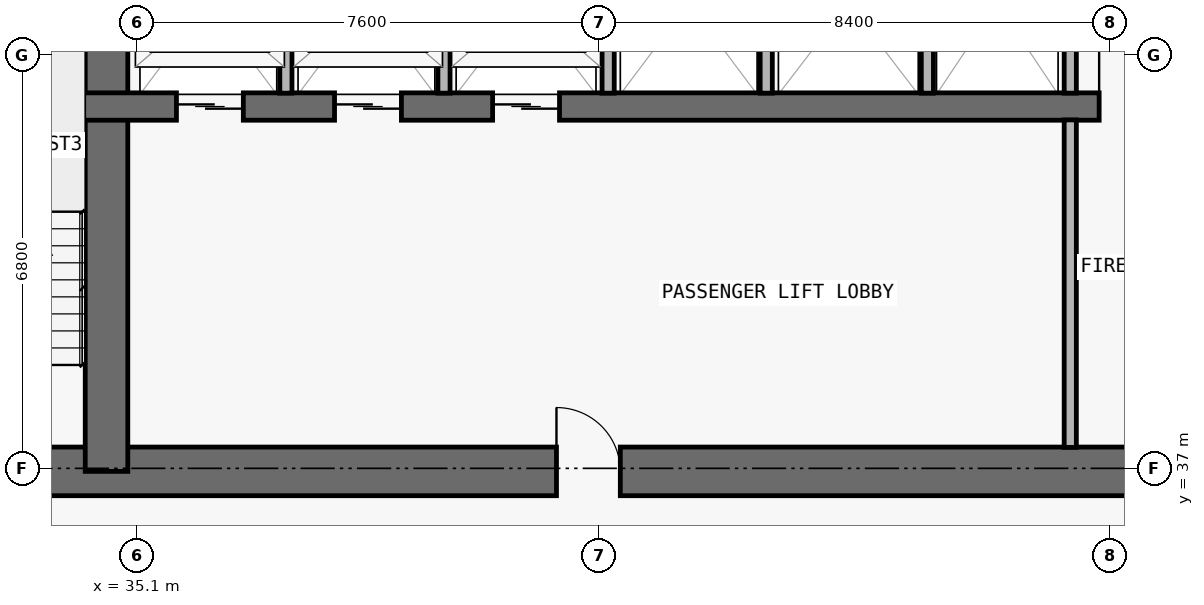
"""IFC4 building model, lengths in metres.
Left out: names, types, materials, properties, quantities, classifications, styles, units other than length and angle.
Written with IfcOpenShell. Run it as: python <this file> out.ifc"""

import sys

from ifc_helpers import new_model, si_unit, direction, frame, frame_2d, origin, place, context, subcontext, project, spatial, rectangle, extrude, element, fill, save


model = new_model("IFC4")
c1 = context("Model", 3, precision=1e-05, world=origin(), true_north=direction((0.0, 1.0)))
c2 = subcontext(c1, "Body", "Model", "MODEL_VIEW")
j1 = project(units=[si_unit("LENGTHUNIT", "METRE"), si_unit("PLANEANGLEUNIT", "RADIAN")], contexts=[c1])
p1 = place(None, origin())
s1 = spatial("IfcSite", under=j1, at=p1, CompositionType="ELEMENT")
p2 = place(p1, origin())
s2 = spatial("IfcBuilding", under=s1, at=p2, CompositionType="ELEMENT")
p3 = place(p2, frame((0.0, 0.0, 91.2)))
s3 = spatial("IfcBuildingStorey", under=s2, at=p3, CompositionType="ELEMENT", Elevation=91.2)
p4 = place(p3, frame((17.85, 36.95, 0.0), z_axis=(0.0, 0.0, 1.0), x_axis=(1.0, 0.0, 0.0)))
e1 = element("IfcWall", 1, at=p4, inside=s3, PredefinedType="SHEAR", context=c2, shape_type="SweptSolid", body=[
    extrude(rectangle(XDim=42.1, YDim=0.8, at=frame_2d((21.05, 0.0))), origin(), (0.0, 0.0, 1.0), 3.05),
])
p5 = place(p4, frame((14.45, 0.0, 0.0)))
e2 = element("IfcOpeningElement", 2, at=p5, cuts=e1, PredefinedType="OPENING", context=c2, shape_type="SweptSolid", body=[
    extrude(rectangle(XDim=1.1, YDim=2.15, at=frame_2d((0.55, 1.075))), frame((0.0, 0.41, 0.0), z_axis=(0.0, -1.0, 0.0), x_axis=(1.0, 0.0, 0.0)), (0.0, 0.0, 1.0), 0.82),
])
p6 = place(p4, frame((6.3, 0.0, 0.0)))
e3 = element("IfcOpeningElement", 3, at=p6, cuts=e1, PredefinedType="OPENING", context=c2, shape_type="SweptSolid", body=[
    extrude(rectangle(XDim=1.05, YDim=2.15, at=frame_2d((0.525, 1.075))), frame((0.0, 0.41, 0.0), z_axis=(0.0, -1.0, 0.0), x_axis=(1.0, 0.0, 0.0)), (0.0, 0.0, 1.0), 0.82),
])
p7 = place(p4, frame((34.8, 0.0, 0.0)))
e4 = element("IfcOpeningElement", 4, at=p7, cuts=e1, PredefinedType="OPENING", context=c2, shape_type="SweptSolid", body=[
    extrude(rectangle(XDim=1.05, YDim=2.15, at=frame_2d((0.525, 1.075))), frame((0.0, 0.41, 0.0), z_axis=(0.0, -1.0, 0.0), x_axis=(1.0, 0.0, 0.0)), (0.0, 0.0, 1.0), 0.82),
])
p8 = place(p4, frame((10.913, 0.0, 0.0)))
e5 = element("IfcOpeningElement", 5, at=p8, cuts=e1, PredefinedType="OPENING", context=c2, shape_type="SweptSolid", body=[
    extrude(rectangle(XDim=1.05, YDim=2.15, at=frame_2d((0.525, 1.075))), frame((0.0, 0.41, 0.0), z_axis=(0.0, -1.0, 0.0), x_axis=(1.0, 0.0, 0.0)), (0.0, 0.0, 1.0), 0.82),
])
p9 = place(p4, frame((24.15, 0.0, 0.0)))
e6 = element("IfcOpeningElement", 6, at=p9, cuts=e1, PredefinedType="OPENING", context=c2, shape_type="SweptSolid", body=[
    extrude(rectangle(XDim=1.05, YDim=2.15, at=frame_2d((0.525, 1.075))), frame((0.0, 0.41, 0.0), z_axis=(0.0, -1.0, 0.0), x_axis=(1.0, 0.0, 0.0)), (0.0, 0.0, 1.0), 0.82),
])
p10 = place(p3, frame((34.6, 36.95, 0.0), z_axis=(0.0, 0.0, 1.0), x_axis=(0.0, 1.0, 0.0)))
e7 = element("IfcWall", 7, at=p10, inside=s3, PredefinedType="SHEAR", context=c2, shape_type="SweptSolid", body=[
    extrude(rectangle(XDim=9.625, YDim=0.7, at=frame_2d((4.812, 0.0))), origin(), (0.0, 0.0, 1.0), 3.05),
])
p11 = place(p3, frame((22.25, 42.95, 0.0), z_axis=(0.0, 0.0, 1.0), x_axis=(1.0, 0.0, 0.0)))
e8 = element("IfcWall", 8, at=p11, inside=s3, PredefinedType="SHEAR", context=c2, shape_type="SweptSolid", body=[
    extrude(rectangle(XDim=33.3, YDim=0.45, at=frame_2d((16.65, 0.0))), origin(), (0.0, 0.0, 1.0), 3.05),
])
p12 = place(p11, frame((1.05, 0.0, 0.0)))
e9 = element("IfcOpeningElement", 9, at=p12, cuts=e8, PredefinedType="OPENING", context=c2, shape_type="SweptSolid", body=[
    extrude(rectangle(XDim=1.2, YDim=2.2, at=frame_2d((0.6, 1.1))), frame((0.0, 0.235, 0.0), z_axis=(0.0, -1.0, 0.0), x_axis=(1.0, 0.0, 0.0)), (0.0, 0.0, 1.0), 0.47),
])
p13 = place(p11, frame((31.05, 0.0, 0.0)))
e10 = element("IfcOpeningElement", 10, at=p13, cuts=e8, PredefinedType="OPENING", context=c2, shape_type="SweptSolid", body=[
    extrude(rectangle(XDim=1.2, YDim=2.2, at=frame_2d((0.6, 1.1))), frame((0.0, 0.235, 0.0), z_axis=(0.0, -1.0, 0.0), x_axis=(1.0, 0.0, 0.0)), (0.0, 0.0, 1.0), 0.47),
])
p14 = place(p11, frame((13.5, 0.0, 0.0)))
e11 = element("IfcOpeningElement", 11, at=p14, cuts=e8, PredefinedType="OPENING", context=c2, shape_type="SweptSolid", body=[
    extrude(rectangle(XDim=1.1, YDim=2.2, at=frame_2d((0.55, 1.1))), frame((0.0, 0.235, 0.0), z_axis=(0.0, -1.0, 0.0), x_axis=(1.0, 0.0, 0.0)), (0.0, 0.0, 1.0), 0.47),
])
p15 = place(p11, frame((16.1, 0.0, 0.0)))
e12 = element("IfcOpeningElement", 12, at=p15, cuts=e8, PredefinedType="OPENING", context=c2, shape_type="SweptSolid", body=[
    extrude(rectangle(XDim=1.1, YDim=2.2, at=frame_2d((0.55, 1.1))), frame((0.0, 0.235, 0.0), z_axis=(0.0, -1.0, 0.0), x_axis=(1.0, 0.0, 0.0)), (0.0, 0.0, 1.0), 0.47),
])
p16 = place(p11, frame((18.7, 0.0, 0.0)))
e13 = element("IfcOpeningElement", 13, at=p16, cuts=e8, PredefinedType="OPENING", context=c2, shape_type="SweptSolid", body=[
    extrude(rectangle(XDim=1.1, YDim=2.2, at=frame_2d((0.55, 1.1))), frame((0.0, 0.235, 0.0), z_axis=(0.0, -1.0, 0.0), x_axis=(1.0, 0.0, 0.0)), (0.0, 0.0, 1.0), 0.47),
])
p17 = place(p11, frame((3.625, 0.0, 0.0)))
e14 = element("IfcOpeningElement", 14, at=p17, cuts=e8, PredefinedType="OPENING", context=c2, shape_type="SweptSolid", body=[
    extrude(rectangle(XDim=1.05, YDim=2.15, at=frame_2d((0.525, 1.075))), frame((0.0, 0.235, 0.0), z_axis=(0.0, -1.0, 0.0), x_axis=(1.0, 0.0, 0.0)), (0.0, 0.0, 1.0), 0.47),
])
p18 = place(p11, frame((28.675, 0.0, 0.0)))
e15 = element("IfcOpeningElement", 15, at=p18, cuts=e8, PredefinedType="OPENING", context=c2, shape_type="SweptSolid", body=[
    extrude(rectangle(XDim=1.05, YDim=2.15, at=frame_2d((0.525, 1.075))), frame((0.0, 0.235, 0.0), z_axis=(0.0, -1.0, 0.0), x_axis=(1.0, 0.0, 0.0)), (0.0, 0.0, 1.0), 0.47),
])
for number, where, z_axis, x_axis in (
    (16, (37.55, 43.17, 0.0), (0.0, 0.0, 1.0), (0.0, 1.0, 0.0)),
    (17, (40.15, 43.17, 0.0), (0.0, 0.0, 1.0), (0.0, 1.0, 0.0)),
    (18, (42.85, 43.17, 0.0), (0.0, 0.0, 1.0), (0.0, 1.0, 0.0)),
    (19, (45.45, 43.17, 0.0), (0.0, 0.0, 1.0), (0.0, 1.0, 0.0)),
    (20, (48.1, 43.17, 0.0), (0.0, 0.0, 1.0), (0.0, 1.0, 0.0)),
):
    element("IfcWall", number, at=place(p3, frame(where, z_axis=z_axis, x_axis=x_axis)), inside=s3, PredefinedType="PARTITIONING", context=c2, shape_type="SweptSolid", body=[
        extrude(rectangle(XDim=3.185, YDim=0.2, at=frame_2d((1.593, 0.0))), origin(), (0.0, 0.0, 1.0), 3.05),
    ])
p19 = place(p3, frame((50.45, 37.345, 0.0), z_axis=(0.0, 0.0, 1.0), x_axis=(0.0, 1.0, 0.0)))
e21 = element("IfcWall", 21, at=p19, inside=s3, PredefinedType="PARTITIONING", context=c2, shape_type="SweptSolid", body=[
    extrude(rectangle(XDim=5.385, YDim=0.2, at=frame_2d((2.692, 0.0))), origin(), (0.0, 0.0, 1.0), 3.05),
])
p20 = place(p3, frame((50.45, 43.17, 0.0), z_axis=(0.0, 0.0, 1.0), x_axis=(0.0, 1.0, 0.0)))
e22 = element("IfcWall", 22, at=p20, inside=s3, PredefinedType="PARTITIONING", context=c2, shape_type="SweptSolid", body=[
    extrude(rectangle(XDim=3.185, YDim=0.2, at=frame_2d((1.593, 0.0))), origin(), (0.0, 0.0, 1.0), 3.05),
])
p21 = place(p14, origin())
e23 = element("IfcDoor", 23, at=p21, inside=s3, OperationType="DOUBLE_DOOR_SLIDING", PredefinedType="DOOR", context=c2, shape_type="SweptSolid", body=[
    extrude(rectangle(XDim=1.1, YDim=2.2, at=frame_2d((0.55, 1.1))), frame((0.0, 0.025, 0.0), z_axis=(0.0, -1.0, 0.0), x_axis=(1.0, 0.0, 0.0)), (0.0, 0.0, 1.0), 0.05),
])
fill(e11, e23)
p22 = place(p15, origin())
e24 = element("IfcDoor", 24, at=p22, inside=s3, OperationType="DOUBLE_DOOR_SLIDING", PredefinedType="DOOR", context=c2, shape_type="SweptSolid", body=[
    extrude(rectangle(XDim=1.1, YDim=2.2, at=frame_2d((0.55, 1.1))), frame((0.0, 0.025, 0.0), z_axis=(0.0, -1.0, 0.0), x_axis=(1.0, 0.0, 0.0)), (0.0, 0.0, 1.0), 0.05),
])
fill(e12, e24)
p23 = place(p16, origin())
e25 = element("IfcDoor", 25, at=p23, inside=s3, OperationType="DOUBLE_DOOR_SLIDING", PredefinedType="DOOR", context=c2, shape_type="SweptSolid", body=[
    extrude(rectangle(XDim=1.1, YDim=2.2, at=frame_2d((0.55, 1.1))), frame((0.0, 0.025, 0.0), z_axis=(0.0, -1.0, 0.0), x_axis=(1.0, 0.0, 0.0)), (0.0, 0.0, 1.0), 0.05),
])
fill(e13, e25)
p24 = place(p18, origin())
e26 = element("IfcDoor", 26, at=p24, inside=s3, OperationType="SINGLE_SWING_LEFT", PredefinedType="DOOR", context=c2, shape_type="SweptSolid", body=[
    extrude(rectangle(XDim=1.05, YDim=2.15, at=frame_2d((0.525, 1.075))), frame((0.0, 0.025, 0.0), z_axis=(0.0, -1.0, 0.0), x_axis=(1.0, 0.0, 0.0)), (0.0, 0.0, 1.0), 0.05),
])
fill(e15, e26)
p25 = place(p9, origin())
e27 = element("IfcDoor", 27, at=p25, inside=s3, OperationType="SINGLE_SWING_LEFT", PredefinedType="DOOR", context=c2, shape_type="SweptSolid", body=[
    extrude(rectangle(XDim=1.05, YDim=2.15, at=frame_2d((0.525, 1.075))), frame((0.0, 0.025, 0.0), z_axis=(0.0, -1.0, 0.0), x_axis=(1.0, 0.0, 0.0)), (0.0, 0.0, 1.0), 0.05),
])
fill(e6, e27)
save(model, sys.argv[1])
